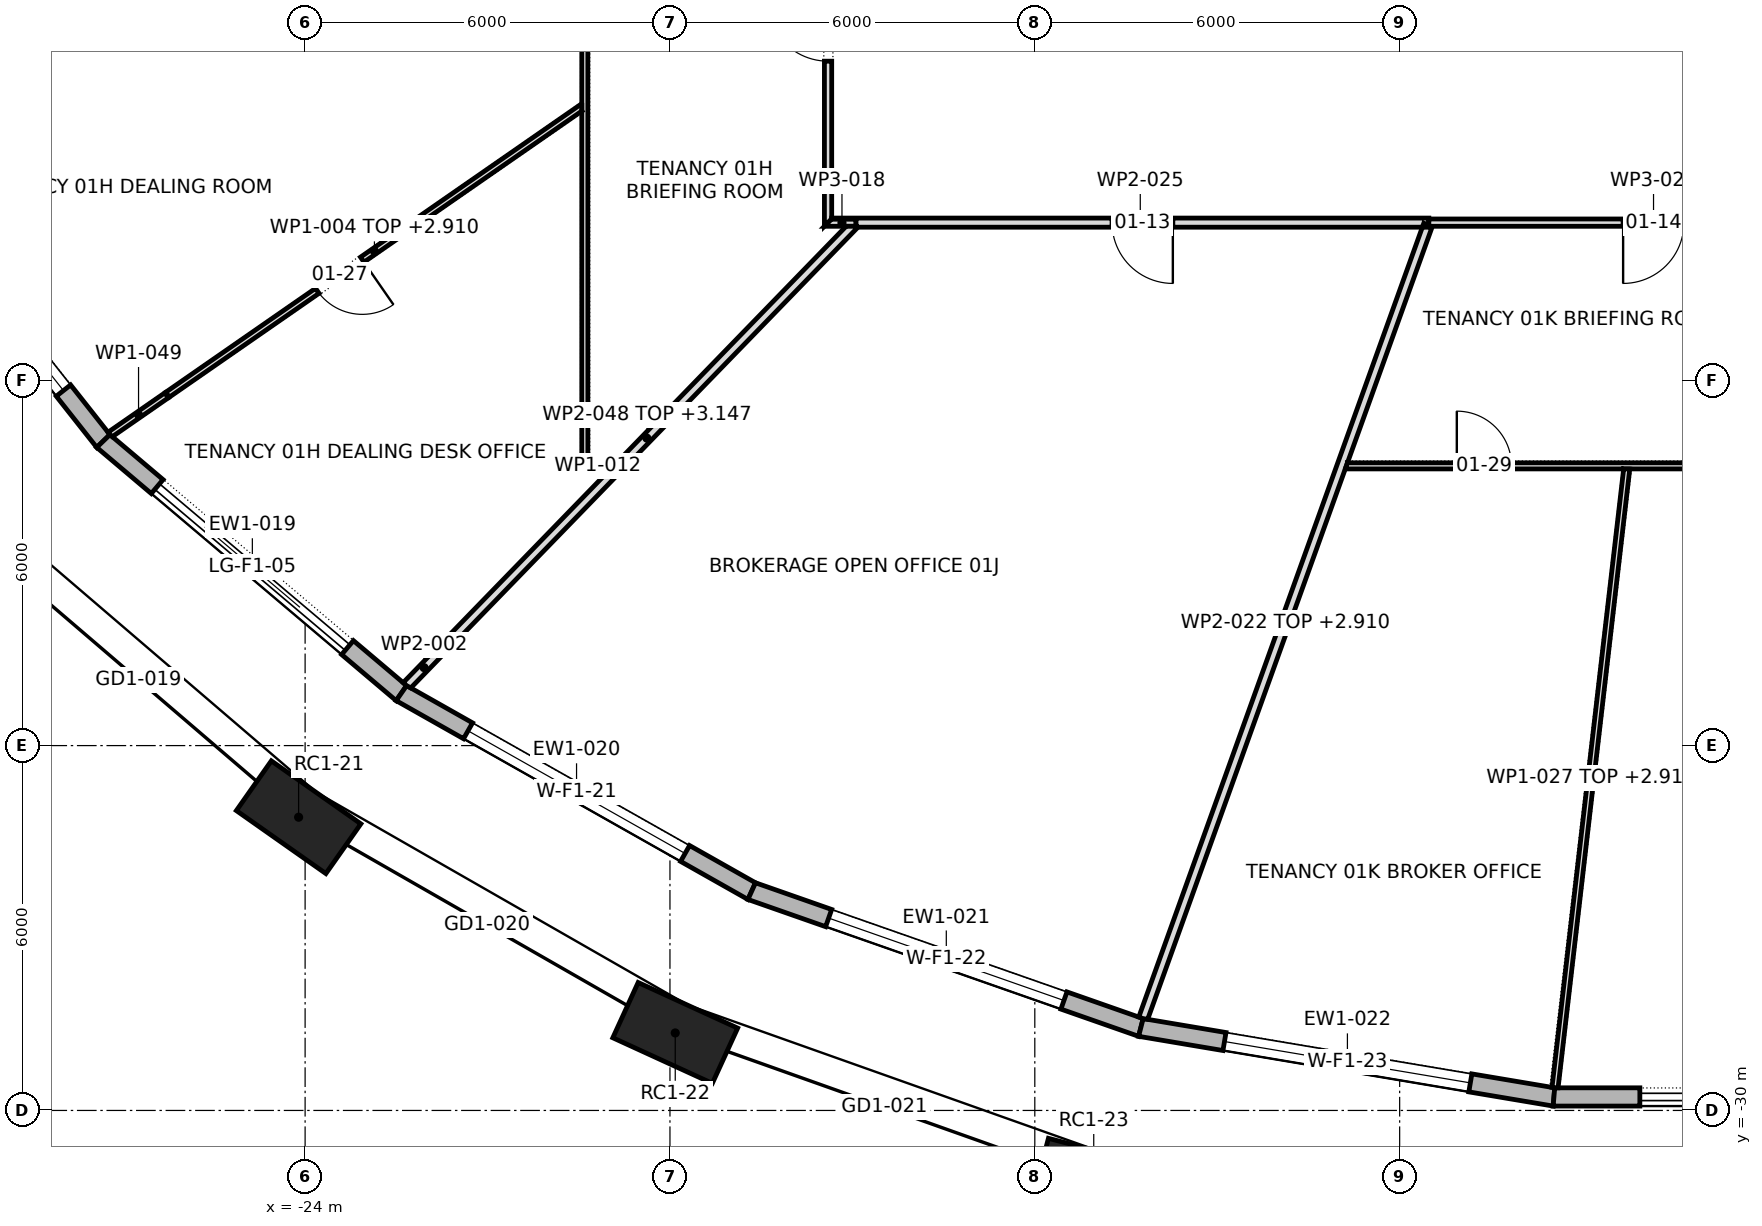
"""IFC4 building model, lengths in metres.
Left out: names, types, materials, properties, quantities, classifications, styles, units other than length and angle.
Written with IfcOpenShell. Run it as: python <this file> out.ifc"""

import sys

from ifc_helpers import new_model, si_unit, direction, frame, frame_2d, origin, origin_2d, place, context, subcontext, project, spatial, polyline, rectangle, outline, extrude, element, fill, save


model = new_model("IFC4")
c1 = context("Model", 3, precision=1e-05, world=origin(), true_north=direction((0.0, 1.0)))
c2 = subcontext(c1, "Body", "Model", "MODEL_VIEW")
j1 = project(units=[si_unit("LENGTHUNIT", "METRE"), si_unit("PLANEANGLEUNIT", "RADIAN")], contexts=[c1])
p1 = place(None, origin())
s1 = spatial("IfcSite", under=j1, at=p1, CompositionType="ELEMENT")
p2 = place(p1, origin())
s2 = spatial("IfcBuilding", under=s1, at=p2, CompositionType="ELEMENT")
p3 = place(p2, frame((0.0, 0.0, 27.7)))
s3 = spatial("IfcBuildingStorey", under=s2, at=p3, CompositionType="ELEMENT", Elevation=27.7)
for number, where, z_axis, x_axis in (
    (1, (-24.107, -25.178, 0.0), (0.0, 0.0, 1.0), (0.818, -0.575, 0.0)),
    (2, (-17.913, -28.725, 0.0), (0.0, 0.0, 1.0), (0.909, -0.417, 0.0)),
    (3, (-11.031, -31.169, 0.0), (0.0, 0.0, 1.0), (0.968, -0.252, 0.0)),
):
    element("IfcColumn", number, at=place(p3, frame(where, z_axis=z_axis, x_axis=x_axis)), inside=s3, PredefinedType="COLUMN", context=c2, shape_type="SweptSolid", body=[
        extrude(rectangle(XDim=1.8, YDim=1.0, at=origin_2d()), origin(), (0.0, 0.0, 1.0), 4.2),
    ])
p4 = place(p3, frame((-31.171, -14.115, 0.0), z_axis=(0.0, 0.0, 1.0), x_axis=(0.619902786528, -0.784678619089, 0.0)))
e4 = element("IfcWall", 4, at=p4, inside=s3, PredefinedType="STANDARD", context=c2, shape_type="SweptSolid", body=[
    extrude(outline(polyline([(-0.016, -0.15), (6.231, -0.15), (6.2, 0.15), (0.016, 0.15), (-0.016, -0.15)])), origin(), (0.0, 0.0, 1.0), 3.9),
])
p5 = place(p4, frame((1.058, 0.0, 0.6)))
e5 = element("IfcOpeningElement", 5, at=p5, cuts=e4, PredefinedType="OPENING", context=c2, shape_type="SweptSolid", body=[
    extrude(rectangle(XDim=4.1, YDim=2.85, at=frame_2d((2.05, 1.425))), frame((0.0, 0.162, 0.0), z_axis=(0.0, -1.0, 0.0), x_axis=(1.0, 0.0, 0.0)), (0.0, 0.0, 1.0), 0.324),
])
p6 = place(p3, frame((-27.318, -18.992, 0.0), z_axis=(0.0, 0.0, 1.0), x_axis=(0.763540615407, -0.645759807223, 0.0)))
e6 = element("IfcWall", 6, at=p6, inside=s3, PredefinedType="STANDARD", context=c2, shape_type="SweptSolid", body=[
    extrude(outline(polyline([(-0.015, -0.15), (6.434, -0.15), (6.406, 0.15), (0.015, 0.15), (-0.015, -0.15)])), origin(), (0.0, 0.0, 1.0), 3.9),
])
p7 = place(p6, frame((1.16, 0.0, 0.0)))
e7 = element("IfcOpeningElement", 7, at=p7, cuts=e6, PredefinedType="OPENING", context=c2, shape_type="SweptSolid", body=[
    extrude(rectangle(XDim=4.1, YDim=3.45, at=frame_2d((2.05, 1.725))), frame((0.0, 0.162, 0.0), z_axis=(0.0, -1.0, 0.0), x_axis=(1.0, 0.0, 0.0)), (0.0, 0.0, 1.0), 0.324),
])
p8 = place(p3, frame((-22.417, -23.137, 0.0), z_axis=(0.0, 0.0, 1.0), x_axis=(0.8705786416, -0.492029296678, 0.0)))
e8 = element("IfcWall", 8, at=p8, inside=s3, PredefinedType="STANDARD", context=c2, shape_type="SweptSolid", body=[
    extrude(outline(polyline([(-0.014, -0.15), (6.631, -0.15), (6.604, 0.15), (0.014, 0.15), (-0.014, -0.15)])), origin(), (0.0, 0.0, 1.0), 3.9),
])
p9 = place(p8, frame((1.259, 0.0, 0.6)))
e9 = element("IfcOpeningElement", 9, at=p9, cuts=e8, PredefinedType="OPENING", context=c2, shape_type="SweptSolid", body=[
    extrude(rectangle(XDim=4.1, YDim=2.85, at=frame_2d((2.05, 1.425))), frame((0.0, 0.162, 0.0), z_axis=(0.0, -1.0, 0.0), x_axis=(1.0, 0.0, 0.0)), (0.0, 0.0, 1.0), 0.324),
])
p10 = place(p3, frame((-16.656, -26.393, 0.0), z_axis=(0.0, 0.0, 1.0), x_axis=(0.943767392455, -0.330610206947, 0.0)))
e10 = element("IfcWall", 10, at=p10, inside=s3, PredefinedType="STANDARD", context=c2, shape_type="SweptSolid", body=[
    extrude(outline(polyline([(-0.013, -0.15), (6.794, -0.15), (6.769, 0.15), (0.013, 0.15), (-0.013, -0.15)])), origin(), (0.0, 0.0, 1.0), 3.9),
])
p11 = place(p10, frame((1.341, 0.0, 0.6)))
e11 = element("IfcOpeningElement", 11, at=p11, cuts=e10, PredefinedType="OPENING", context=c2, shape_type="SweptSolid", body=[
    extrude(rectangle(XDim=4.1, YDim=2.85, at=frame_2d((2.05, 1.425))), frame((0.0, 0.162, 0.0), z_axis=(0.0, -1.0, 0.0), x_axis=(1.0, 0.0, 0.0)), (0.0, 0.0, 1.0), 0.324),
])
p12 = place(p3, frame((-10.256, -28.635, 0.0), z_axis=(0.0, 0.0, 1.0), x_axis=(0.986141805867, -0.165904607291, 0.0)))
e12 = element("IfcWall", 12, at=p12, inside=s3, PredefinedType="STANDARD", context=c2, shape_type="SweptSolid", body=[
    extrude(outline(polyline([(-0.013, -0.15), (6.901, -0.15), (6.876, 0.15), (0.013, 0.15), (-0.013, -0.15)])), origin(), (0.0, 0.0, 1.0), 3.9),
])
p13 = place(p12, frame((1.394, 0.0, 0.6)))
e13 = element("IfcOpeningElement", 13, at=p13, cuts=e12, PredefinedType="OPENING", context=c2, shape_type="SweptSolid", body=[
    extrude(rectangle(XDim=4.1, YDim=2.85, at=frame_2d((2.05, 1.425))), frame((0.0, 0.162, 0.0), z_axis=(0.0, -1.0, 0.0), x_axis=(1.0, 0.0, 0.0)), (0.0, 0.0, 1.0), 0.324),
])
p14 = place(p3, frame((-3.463, -29.778, 0.0), z_axis=(0.0, 0.0, 1.0), x_axis=(1.0, 0.0, 0.0)))
e14 = element("IfcWall", 14, at=p14, inside=s3, PredefinedType="STANDARD", context=c2, shape_type="SweptSolid", body=[
    extrude(outline(polyline([(-0.012, -0.15), (6.938, -0.15), (6.913, 0.15), (0.012, 0.15), (-0.012, -0.15)])), origin(), (0.0, 0.0, 1.0), 3.9),
])
p15 = place(p14, frame((1.413, 0.0, 0.0)))
e15 = element("IfcOpeningElement", 15, at=p15, cuts=e14, PredefinedType="OPENING", context=c2, shape_type="SweptSolid", body=[
    extrude(rectangle(XDim=4.1, YDim=3.45, at=frame_2d((2.05, 1.725))), frame((0.0, 0.162, 0.0), z_axis=(0.0, -1.0, 0.0), x_axis=(1.0, 0.0, 0.0)), (0.0, 0.0, 1.0), 0.324),
])
p16 = place(p3, frame((-22.333, -23.018, 0.0), z_axis=(0.0, 0.0, 1.0), x_axis=(0.696376805516, 0.717676350969, 0.0)))
e16 = element("IfcWall", 16, at=p16, inside=s3, PredefinedType="PARTITIONING", context=c2, shape_type="SweptSolid", body=[
    extrude(outline(polyline([(0.0, 0.075), (0.0, 0.072), (0.005, 0.001), (0.025, -0.075), (0.825, -0.075), (0.825, 0.075), (0.0, 0.075)])), origin(), (0.0, 0.0, 1.0), 3.9),
])
p17 = place(p3, frame((-19.4, -19.45, 0.0), z_axis=(0.0, 0.0, 1.0), x_axis=(0.0, 1.0, 0.0)))
e17 = element("IfcWall", 17, at=p17, inside=s3, PredefinedType="PARTITIONING", context=c2, shape_type="SweptSolid", body=[
    extrude(outline(polyline([(0.1, -0.05), (1.802, -0.05), (3.503, -0.05), (5.205, -0.05), (6.907, -0.05), (8.608, -0.05), (10.31, -0.05), (10.31, -0.05), (10.41, -0.05), (10.41, -0.05), (12.25, -0.05), (14.089, -0.05), (15.929, -0.05), (17.769, -0.05), (17.769, -0.047), (17.761, 0.044), (17.769, 0.044), (17.769, 0.045), (17.751, 0.044), (17.75, 0.05), (16.082, 0.05), (14.413, 0.05), (14.406, 0.048), (14.406, 0.05), (12.702, 0.05), (10.999, 0.05), (9.296, 0.05), (7.593, 0.05), (5.89, 0.05), (5.886, 0.048), (5.885, 0.05), (3.923, 0.05), (1.961, 0.05), (0.0, 0.05), (0.1, -0.05), (0.1, -0.05)])), origin(), (0.0, 0.0, 1.0), 3.9),
])
p18 = place(p17, frame((11.965, 0.0, 0.0)))
e18 = element("IfcOpeningElement", 18, at=p18, cuts=e17, PredefinedType="OPENING", context=c2, shape_type="SweptSolid", body=[
    extrude(rectangle(XDim=0.9, YDim=2.1, at=frame_2d((0.45, 1.05))), frame((0.0, 0.062, 0.0), z_axis=(0.0, -1.0, 0.0), x_axis=(1.0, 0.0, 0.0)), (0.0, 0.0, 1.0), 0.124),
])
p19 = place(p3, frame((-19.422, -13.485, 0.0), z_axis=(0.0, 0.0, 1.0), x_axis=(-0.821711016695, -0.569904382368, 0.0)))
e19 = element("IfcWall", 19, at=p19, inside=s3, PredefinedType="PARTITIONING", context=c2, shape_type="SweptSolid", body=[
    extrude(outline(polyline([(8.334, 0.05), (6.681, 0.05), (5.028, 0.05), (3.375, 0.05), (1.722, 0.05), (0.069, 0.05), (0.0, -0.049), (0.0, -0.05), (1.667, -0.05), (3.334, -0.05), (5.0, -0.05), (6.667, -0.05), (8.334, -0.05), (8.334, 0.05)])), origin(), (0.0, 0.0, 1.0), 2.91),
])
p20 = place(p19, frame((4.428, 0.0, 0.0)))
e20 = element("IfcOpeningElement", 20, at=p20, cuts=e19, PredefinedType="OPENING", context=c2, shape_type="SweptSolid", body=[
    extrude(rectangle(XDim=0.9, YDim=2.1, at=frame_2d((0.45, 1.05))), frame((0.0, 0.062, 0.0), z_axis=(0.0, -1.0, 0.0), x_axis=(1.0, 0.0, 0.0)), (0.0, 0.0, 1.0), 0.124),
])
p21 = place(p3, frame((-18.972, -19.4, 0.0), z_axis=(0.0, 0.0, 1.0), x_axis=(-1.0, 0.0, 0.0)))
e21 = element("IfcWall", 21, at=p21, inside=s3, PredefinedType="PARTITIONING", context=c2, shape_type="SweptSolid", body=[
    extrude(outline(polyline([(0.0, -0.05), (0.377, -0.05), (0.478, 0.05), (0.0, 0.05), (0.0, -0.05)])), origin(), (0.0, 0.0, 1.0), 3.9),
])
p22 = place(p3, frame((-15.4, -15.46, 0.0), z_axis=(0.0, 0.0, 1.0), x_axis=(0.0, 1.0, 0.0)))
e22 = element("IfcWall", 22, at=p22, inside=s3, PredefinedType="PARTITIONING", context=c2, shape_type="SweptSolid", body=[
    extrude(outline(polyline([(6.37, 0.06), (4.777, 0.06), (3.185, 0.06), (1.593, 0.06), (0.0, 0.06), (0.12, -0.06), (1.683, -0.06), (3.245, -0.06), (4.807, -0.06), (6.37, -0.06), (6.37, 0.06)])), origin(), (0.0, 0.0, 1.0), 3.9),
])
p23 = place(p22, frame((2.715, 0.0, 0.0)))
e23 = element("IfcOpeningElement", 23, at=p23, cuts=e22, PredefinedType="OPENING", context=c2, shape_type="SweptSolid", body=[
    extrude(rectangle(XDim=1.0, YDim=2.1, at=frame_2d((0.5, 1.05))), frame((0.0, 0.072, 0.0), z_axis=(0.0, -1.0, 0.0), x_axis=(1.0, 0.0, 0.0)), (0.0, 0.0, 1.0), 0.144),
])
p24 = place(p3, frame((-14.94, -15.4, 0.0), z_axis=(0.0, 0.0, 1.0), x_axis=(-1.0, 0.0, 0.0)))
e24 = element("IfcWall", 24, at=p24, inside=s3, PredefinedType="PARTITIONING", context=c2, shape_type="SweptSolid", body=[
    extrude(outline(polyline([(0.0, -0.06), (0.4, -0.06), (0.52, 0.06), (0.0, 0.06), (0.0, -0.06)])), origin(), (0.0, 0.0, 1.0), 3.9),
])
p25 = place(p3, frame((-10.219, -28.49, 0.0), z_axis=(0.0, 0.0, 1.0), x_axis=(0.337910330096, 0.941178308725, 0.0)))
e25 = element("IfcWall", 25, at=p25, inside=s3, PredefinedType="PARTITIONING", context=c2, shape_type="SweptSolid", body=[
    extrude(outline(polyline([(0.014, -0.075), (1.958, -0.075), (3.902, -0.075), (5.845, -0.075), (7.789, -0.075), (9.733, -0.075), (9.737, -0.073), (9.738, -0.075), (11.115, -0.075), (12.493, -0.075), (13.871, -0.075), (13.871, -0.075), (13.853, -0.024), (13.853, -0.024), (13.851, -0.02), (13.837, -0.025), (13.801, 0.075), (11.829, 0.075), (9.858, 0.075), (7.886, 0.075), (5.915, 0.075), (3.943, 0.075), (1.972, 0.075), (0.0, 0.075), (0.0, 0.066), (0.0, -0.001), (0.014, -0.075)])), origin(), (0.0, 0.0, 1.0), 2.91),
])
p26 = place(p3, frame((-6.894, -19.4, 0.0), z_axis=(0.0, 0.0, 1.0), x_axis=(1.0, 0.0, 0.0)))
e26 = element("IfcWall", 26, at=p26, inside=s3, PredefinedType="PARTITIONING", context=c2, shape_type="SweptSolid", body=[
    extrude(outline(polyline([(0.0, -0.05), (1.526, -0.05), (3.052, -0.05), (4.578, -0.05), (4.578, -0.049), (4.587, -0.05), (6.454, -0.05), (8.321, -0.05), (10.188, -0.05), (12.055, -0.05), (13.922, -0.05), (13.925, -0.049), (13.925, -0.05), (15.696, -0.05), (17.468, -0.05), (19.239, -0.05), (19.243, -0.047), (19.245, -0.05), (20.848, -0.05), (22.451, -0.05), (24.054, -0.05), (25.657, -0.05), (25.657, -0.05), (25.614, -0.005), (25.614, -0.005), (25.561, 0.05), (23.819, 0.05), (22.076, 0.05), (20.334, 0.05), (18.591, 0.05), (16.849, 0.05), (15.106, 0.05), (13.364, 0.05), (13.364, 0.05), (13.264, 0.05), (13.264, 0.05), (11.781, 0.05), (10.297, 0.05), (8.814, 0.05), (8.814, 0.05), (8.714, 0.05), (8.714, 0.05), (6.978, 0.05), (5.243, 0.05), (3.507, 0.05), (1.771, 0.05), (0.036, 0.05), (0.0, -0.049), (0.0, -0.05)])), origin(), (0.0, 0.0, 1.0), 3.9),
])
p27 = place(p26, frame((6.249, 0.0, 0.0)))
e27 = element("IfcOpeningElement", 27, at=p27, cuts=e26, PredefinedType="OPENING", context=c2, shape_type="SweptSolid", body=[
    extrude(rectangle(XDim=0.9, YDim=2.1, at=frame_2d((0.45, 1.05))), frame((0.0, 0.062, 0.0), z_axis=(0.0, -1.0, 0.0), x_axis=(1.0, 0.0, 0.0)), (0.0, 0.0, 1.0), 0.124),
])
p28 = place(p26, frame((1.834, 0.0, 0.0)))
e28 = element("IfcOpeningElement", 28, at=p28, cuts=e26, PredefinedType="OPENING", context=c2, shape_type="SweptSolid", body=[
    extrude(rectangle(XDim=0.9, YDim=2.1, at=frame_2d((0.45, 1.05))), frame((0.0, 0.062, 0.0), z_axis=(0.0, -1.0, 0.0), x_axis=(1.0, 0.0, 0.0)), (0.0, 0.0, 1.0), 0.124),
])
p29 = place(p3, frame((-5.52, -15.4, 0.0), z_axis=(0.0, 0.0, 1.0), x_axis=(-1.0, 0.0, 0.0)))
e29 = element("IfcWall", 29, at=p29, inside=s3, PredefinedType="PARTITIONING", context=c2, shape_type="SweptSolid", body=[
    extrude(outline(polyline([(0.0, -0.075), (1.964, -0.075), (3.928, -0.075), (5.892, -0.075), (7.856, -0.075), (9.82, -0.075), (9.82, -0.06), (9.42, -0.06), (9.42, 0.045), (9.389, 0.075), (7.532, 0.075), (5.676, 0.075), (3.82, 0.075), (1.963, 0.075), (0.106, 0.075), (0.083, 0.01), (0.0, 0.039), (0.0, -0.075)])), origin(), (0.0, 0.0, 1.0), 3.9),
])
p30 = place(p29, frame((4.21, 0.0, 0.0)))
e30 = element("IfcOpeningElement", 30, at=p30, cuts=e29, PredefinedType="OPENING", context=c2, shape_type="SweptSolid", body=[
    extrude(rectangle(XDim=1.0, YDim=2.1, at=frame_2d((0.5, 1.05))), frame((0.0, 0.087, 0.0), z_axis=(0.0, -1.0, 0.0), x_axis=(1.0, 0.0, 0.0)), (0.0, 0.0, 1.0), 0.174),
])
p31 = place(p3, frame((-3.445, -29.626, 0.0), z_axis=(0.0, 0.0, 1.0), x_axis=(0.115096942751, 0.993354263981, 0.0)))
e31 = element("IfcWall", 31, at=p31, inside=s3, PredefinedType="PARTITIONING", context=c2, shape_type="SweptSolid", body=[
    extrude(outline(polyline([(10.25, -0.05), (10.25, -0.047), (10.238, 0.05), (8.532, 0.05), (6.825, 0.05), (5.119, 0.05), (3.413, 0.05), (1.706, 0.05), (0.0, 0.05), (0.0, -0.018), (0.004, -0.05), (1.711, -0.05), (3.419, -0.05), (5.127, -0.05), (6.834, -0.05), (8.542, -0.05), (10.25, -0.05)])), origin(), (0.0, 0.0, 1.0), 2.91),
])
p32 = place(p3, frame((1.87, -15.4, 0.0), z_axis=(0.0, 0.0, 1.0), x_axis=(-1.0, 0.0, 0.0)))
e32 = element("IfcWall", 32, at=p32, inside=s3, PredefinedType="PARTITIONING", context=c2, shape_type="SweptSolid", body=[
    extrude(rectangle(XDim=7.39, YDim=0.12, at=frame_2d((3.695, 0.0))), origin(), (0.0, 0.0, 1.0), 3.9),
])
p33 = place(p32, frame((3.195, 0.0, 0.0)))
e33 = element("IfcOpeningElement", 33, at=p33, cuts=e32, PredefinedType="OPENING", context=c2, shape_type="SweptSolid", body=[
    extrude(rectangle(XDim=1.0, YDim=2.1, at=frame_2d((0.5, 1.05))), frame((0.0, 0.072, 0.0), z_axis=(0.0, -1.0, 0.0), x_axis=(1.0, 0.0, 0.0)), (0.0, 0.0, 1.0), 0.144),
])
p34 = place(p3, frame((-21.759, -22.425, 0.0), z_axis=(0.0, 0.0, 1.0), x_axis=(0.696482576403, 0.717573704066, 0.0)))
e34 = element("IfcWall", 34, at=p34, inside=s3, PredefinedType="PARTITIONING", context=c2, shape_type="SweptSolid", body=[
    extrude(outline(polyline([(9.758, -0.075), (9.758, -0.074), (9.737, -0.052), (9.747, -0.042), (9.688, 0.02), (9.688, 0.02), (9.634, 0.075), (7.782, 0.075), (5.93, 0.075), (4.078, 0.075), (4.076, 0.073), (4.073, 0.075), (2.716, 0.075), (1.358, 0.075), (0.0, 0.075), (0.0, -0.075), (1.952, -0.075), (3.903, -0.075), (5.855, -0.075), (7.806, -0.075), (9.758, -0.075)])), origin(), (0.0, 0.0, 1.0), 3.147),
])
p35 = place(p3, frame((-26.27, -18.235, 0.0), z_axis=(0.0, 0.0, 1.0), x_axis=(-0.821724425531, -0.569885048484, 0.0)))
e35 = element("IfcWall", 35, at=p35, inside=s3, PredefinedType="PARTITIONING", context=c2, shape_type="SweptSolid", body=[
    extrude(outline(polyline([(1.147, -0.05), (1.147, -0.048), (1.144, 0.0), (1.13, 0.05), (0.0, 0.05), (0.0, -0.05), (1.147, -0.05)])), origin(), (0.0, 0.0, 1.0), 3.9),
])
p36 = place(p5, origin())
e36 = element("IfcWindow", 36, at=p36, inside=s3, PartitioningType="TRIPLE_PANEL_VERTICAL", PredefinedType="WINDOW", context=c2, shape_type="SweptSolid", body=[
    extrude(rectangle(XDim=4.1, YDim=2.85, at=frame_2d((2.05, 1.425))), frame((0.0, 0.03, 0.0), z_axis=(0.0, -1.0, 0.0), x_axis=(1.0, 0.0, 0.0)), (0.0, 0.0, 1.0), 0.06),
])
fill(e5, e36)
p37 = place(p7, origin())
e37 = element("IfcDoor", 37, at=p37, inside=s3, OperationType="DOUBLE_DOOR_SLIDING", PredefinedType="DOOR", context=c2, shape_type="SweptSolid", body=[
    extrude(rectangle(XDim=4.1, YDim=3.45, at=frame_2d((2.05, 1.725))), frame((0.0, 0.025, 0.0), z_axis=(0.0, -1.0, 0.0), x_axis=(1.0, 0.0, 0.0)), (0.0, 0.0, 1.0), 0.05),
])
fill(e7, e37)
p38 = place(p9, origin())
e38 = element("IfcWindow", 38, at=p38, inside=s3, PartitioningType="TRIPLE_PANEL_VERTICAL", PredefinedType="WINDOW", context=c2, shape_type="SweptSolid", body=[
    extrude(rectangle(XDim=4.1, YDim=2.85, at=frame_2d((2.05, 1.425))), frame((0.0, 0.03, 0.0), z_axis=(0.0, -1.0, 0.0), x_axis=(1.0, 0.0, 0.0)), (0.0, 0.0, 1.0), 0.06),
])
fill(e9, e38)
p39 = place(p11, origin())
e39 = element("IfcWindow", 39, at=p39, inside=s3, PartitioningType="TRIPLE_PANEL_VERTICAL", PredefinedType="WINDOW", context=c2, shape_type="SweptSolid", body=[
    extrude(rectangle(XDim=4.1, YDim=2.85, at=frame_2d((2.05, 1.425))), frame((0.0, 0.03, 0.0), z_axis=(0.0, -1.0, 0.0), x_axis=(1.0, 0.0, 0.0)), (0.0, 0.0, 1.0), 0.06),
])
fill(e11, e39)
p40 = place(p13, origin())
e40 = element("IfcWindow", 40, at=p40, inside=s3, PartitioningType="TRIPLE_PANEL_VERTICAL", PredefinedType="WINDOW", context=c2, shape_type="SweptSolid", body=[
    extrude(rectangle(XDim=4.1, YDim=2.85, at=frame_2d((2.05, 1.425))), frame((0.0, 0.03, 0.0), z_axis=(0.0, -1.0, 0.0), x_axis=(1.0, 0.0, 0.0)), (0.0, 0.0, 1.0), 0.06),
])
fill(e13, e40)
p41 = place(p15, origin())
e41 = element("IfcDoor", 41, at=p41, inside=s3, OperationType="DOUBLE_DOOR_SLIDING", PredefinedType="DOOR", context=c2, shape_type="SweptSolid", body=[
    extrude(rectangle(XDim=4.1, YDim=3.45, at=frame_2d((2.05, 1.725))), frame((0.0, 0.025, 0.0), z_axis=(0.0, -1.0, 0.0), x_axis=(1.0, 0.0, 0.0)), (0.0, 0.0, 1.0), 0.05),
])
fill(e15, e41)
p42 = place(p23, origin())
e42 = element("IfcDoor", 42, at=p42, inside=s3, OperationType="SINGLE_SWING_LEFT", PredefinedType="DOOR", context=c2, shape_type="SweptSolid", body=[
    extrude(rectangle(XDim=1.0, YDim=2.1, at=frame_2d((0.5, 1.05))), frame((0.0, 0.025, 0.0), z_axis=(0.0, -1.0, 0.0), x_axis=(1.0, 0.0, 0.0)), (0.0, 0.0, 1.0), 0.05),
])
fill(e23, e42)
p43 = place(p30, origin())
e43 = element("IfcDoor", 43, at=p43, inside=s3, OperationType="SINGLE_SWING_RIGHT", PredefinedType="DOOR", context=c2, shape_type="SweptSolid", body=[
    extrude(rectangle(XDim=1.0, YDim=2.1, at=frame_2d((0.5, 1.05))), frame((0.0, 0.025, 0.0), z_axis=(0.0, -1.0, 0.0), x_axis=(1.0, 0.0, 0.0)), (0.0, 0.0, 1.0), 0.05),
])
fill(e30, e43)
p44 = place(p33, origin())
e44 = element("IfcDoor", 44, at=p44, inside=s3, OperationType="SINGLE_SWING_LEFT", PredefinedType="DOOR", context=c2, shape_type="SweptSolid", body=[
    extrude(rectangle(XDim=1.0, YDim=2.1, at=frame_2d((0.5, 1.05))), frame((0.0, 0.025, 0.0), z_axis=(0.0, -1.0, 0.0), x_axis=(1.0, 0.0, 0.0)), (0.0, 0.0, 1.0), 0.05),
])
fill(e33, e44)
p45 = place(p20, origin())
e45 = element("IfcDoor", 45, at=p45, inside=s3, OperationType="SINGLE_SWING_RIGHT", PredefinedType="DOOR", context=c2, shape_type="SweptSolid", body=[
    extrude(rectangle(XDim=0.9, YDim=2.1, at=frame_2d((0.45, 1.05))), frame((0.0, 0.025, 0.0), z_axis=(0.0, -1.0, 0.0), x_axis=(1.0, 0.0, 0.0)), (0.0, 0.0, 1.0), 0.05),
])
fill(e20, e45)
p46 = place(p28, origin())
e46 = element("IfcDoor", 46, at=p46, inside=s3, OperationType="SINGLE_SWING_RIGHT", PredefinedType="DOOR", context=c2, shape_type="SweptSolid", body=[
    extrude(rectangle(XDim=0.9, YDim=2.1, at=frame_2d((0.45, 1.05))), frame((0.0, 0.025, 0.0), z_axis=(0.0, -1.0, 0.0), x_axis=(1.0, 0.0, 0.0)), (0.0, 0.0, 1.0), 0.05),
])
fill(e28, e46)
save(model, sys.argv[1])
